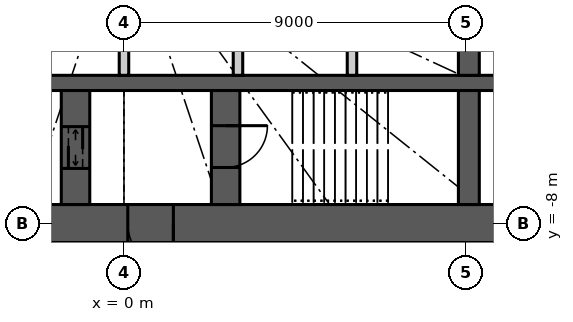
"""IFC4 building model, lengths in metres.
Left out: names, types, materials, properties, quantities, classifications, styles, units other than length and angle.
Written with IfcOpenShell. Run it as: python <this file> out.ifc"""

import sys

from ifc_helpers import new_model, si_unit, direction, frame, frame_2d, origin, place, context, subcontext, project, spatial, rectangle, extrude, element, fill, save


model = new_model("IFC4")
c1 = context("Model", 3, precision=1e-05, world=origin(), true_north=direction((0.0, 1.0)))
c2 = subcontext(c1, "Body", "Model", "MODEL_VIEW")
j1 = project(units=[si_unit("LENGTHUNIT", "METRE"), si_unit("PLANEANGLEUNIT", "RADIAN")], contexts=[c1])
p1 = place(None, origin())
s1 = spatial("IfcSite", under=j1, at=p1, CompositionType="ELEMENT")
p2 = place(p1, origin())
s2 = spatial("IfcBuilding", under=s1, at=p2, CompositionType="ELEMENT")
p3 = place(p2, frame((0.0, 0.0, -6.0)))
s3 = spatial("IfcBuildingStorey", under=s2, at=p3, CompositionType="ELEMENT", Elevation=-6.0)
p4 = place(p3, frame((12.5, -8.0, 0.0), z_axis=(0.0, 0.0, 1.0), x_axis=(-1.0, 0.0, 0.0)))
e1 = element("IfcWall", 1, at=p4, inside=s3, PredefinedType="SHEAR", context=c2, shape_type="SweptSolid", body=[
    extrude(rectangle(XDim=25.0, YDim=1.0, at=frame_2d((12.5, 0.0))), origin(), (0.0, 0.0, 1.0), 6.0),
])
p5 = place(p4, frame((11.2, 0.0, 0.0)))
e2 = element("IfcOpeningElement", 2, at=p5, cuts=e1, PredefinedType="OPENING", context=c2, shape_type="SweptSolid", body=[
    extrude(rectangle(XDim=1.2, YDim=2.2, at=frame_2d((0.6, 1.1))), frame((0.0, 0.51, 0.0), z_axis=(0.0, -1.0, 0.0), x_axis=(1.0, 0.0, 0.0)), (0.0, 0.0, 1.0), 1.02),
])
p6 = place(p4, frame((18.8, 0.0, 0.0)))
e3 = element("IfcOpeningElement", 3, at=p6, cuts=e1, PredefinedType="OPENING", context=c2, shape_type="SweptSolid", body=[
    extrude(rectangle(XDim=0.9, YDim=2.2, at=frame_2d((0.45, 1.1))), frame((0.0, 0.51, 0.0), z_axis=(0.0, -1.0, 0.0), x_axis=(1.0, 0.0, 0.0)), (0.0, 0.0, 1.0), 1.02),
])
p7 = place(p3, frame((-11.5, -4.3, 0.0), z_axis=(0.0, 0.0, 1.0), x_axis=(1.0, 0.0, 0.0)))
e4 = element("IfcWall", 4, at=p7, inside=s3, PredefinedType="SHEAR", context=c2, shape_type="SweptSolid", body=[
    extrude(rectangle(XDim=23.0, YDim=0.4, at=frame_2d((11.5, 0.0))), origin(), (0.0, 0.0, 1.0), 6.0),
])
p8 = place(p3, frame((9.075, -4.1, 0.0), z_axis=(0.0, 0.0, 1.0), x_axis=(0.0, 1.0, 0.0)))
e5 = element("IfcWall", 5, at=p8, inside=s3, PredefinedType="SHEAR", context=c2, shape_type="SweptSolid", body=[
    extrude(rectangle(XDim=2.35, YDim=0.55, at=frame_2d((1.175, 0.0))), origin(), (0.0, 0.0, 1.0), 6.0),
])
p9 = place(p3, frame((9.075, -7.5, 0.0), z_axis=(0.0, 0.0, 1.0), x_axis=(0.0, 1.0, 0.0)))
e6 = element("IfcWall", 6, at=p9, inside=s3, PredefinedType="SHEAR", context=c2, shape_type="SweptSolid", body=[
    extrude(rectangle(XDim=3.0, YDim=0.55, at=frame_2d((1.5, 0.0))), origin(), (0.0, 0.0, 1.0), 6.0),
])
p10 = place(p3, frame((2.675, -7.5, 0.0), z_axis=(0.0, 0.0, 1.0), x_axis=(0.0, 1.0, 0.0)))
e7 = element("IfcWall", 7, at=p10, inside=s3, PredefinedType="SHEAR", context=c2, shape_type="SweptSolid", body=[
    extrude(rectangle(XDim=3.0, YDim=0.75, at=frame_2d((1.5, 0.0))), origin(), (0.0, 0.0, 1.0), 6.0),
])
p11 = place(p10, frame((0.975, 0.0, 0.0)))
e8 = element("IfcOpeningElement", 8, at=p11, cuts=e7, PredefinedType="OPENING", context=c2, shape_type="SweptSolid", body=[
    extrude(rectangle(XDim=1.1, YDim=2.2, at=frame_2d((0.55, 1.1))), frame((0.0, 0.385, 0.0), z_axis=(0.0, -1.0, 0.0), x_axis=(1.0, 0.0, 0.0)), (0.0, 0.0, 1.0), 0.77),
])
p12 = place(p3, frame((-1.275, -7.5, 0.0), z_axis=(0.0, 0.0, 1.0), x_axis=(0.0, 1.0, 0.0)))
e9 = element("IfcWall", 9, at=p12, inside=s3, PredefinedType="SHEAR", context=c2, shape_type="SweptSolid", body=[
    extrude(rectangle(XDim=3.0, YDim=0.75, at=frame_2d((1.5, 0.0))), origin(), (0.0, 0.0, 1.0), 6.0),
])
p13 = place(p12, frame((0.95, 0.0, 0.0)))
e10 = element("IfcOpeningElement", 10, at=p13, cuts=e9, PredefinedType="OPENING", context=c2, shape_type="SweptSolid", body=[
    extrude(rectangle(XDim=1.1, YDim=2.2, at=frame_2d((0.55, 1.1))), frame((0.0, 0.385, 0.0), z_axis=(0.0, -1.0, 0.0), x_axis=(1.0, 0.0, 0.0)), (0.0, 0.0, 1.0), 0.77),
])
for number, where, z_axis, x_axis in (
    (11, (0.0, -4.1, 0.0), (0.0, 0.0, 1.0), (0.0, 1.0, 0.0)),
    (12, (3.0, -4.1, 0.0), (0.0, 0.0, 1.0), (0.0, 1.0, 0.0)),
    (13, (6.0, -4.1, 0.0), (0.0, 0.0, 1.0), (0.0, 1.0, 0.0)),
):
    element("IfcWall", number, at=place(p3, frame(where, z_axis=z_axis, x_axis=x_axis)), inside=s3, PredefinedType="PARTITIONING", context=c2, shape_type="SweptSolid", body=[
        extrude(rectangle(XDim=2.35, YDim=0.25, at=frame_2d((1.175, 0.0))), origin(), (0.0, 0.0, 1.0), 6.0),
    ])
p14 = place(p5, origin())
e14 = element("IfcDoor", 14, at=p14, inside=s3, OperationType="SINGLE_SWING_LEFT", PredefinedType="DOOR", context=c2, shape_type="SweptSolid", body=[
    extrude(rectangle(XDim=1.2, YDim=2.2, at=frame_2d((0.6, 1.1))), frame((0.0, 0.025, 0.0), z_axis=(0.0, -1.0, 0.0), x_axis=(1.0, 0.0, 0.0)), (0.0, 0.0, 1.0), 0.05),
])
fill(e2, e14)
p15 = place(p11, origin())
e15 = element("IfcDoor", 15, at=p15, inside=s3, OperationType="SINGLE_SWING_RIGHT", PredefinedType="DOOR", context=c2, shape_type="SweptSolid", body=[
    extrude(rectangle(XDim=1.1, YDim=2.2, at=frame_2d((0.55, 1.1))), frame((0.0, 0.025, 0.0), z_axis=(0.0, -1.0, 0.0), x_axis=(1.0, 0.0, 0.0)), (0.0, 0.0, 1.0), 0.05),
])
fill(e8, e15)
p16 = place(p13, origin())
e16 = element("IfcDoor", 16, at=p16, inside=s3, OperationType="DOUBLE_DOOR_SLIDING", PredefinedType="DOOR", context=c2, shape_type="SweptSolid", body=[
    extrude(rectangle(XDim=1.1, YDim=2.2, at=frame_2d((0.55, 1.1))), frame((0.0, 0.025, 0.0), z_axis=(0.0, -1.0, 0.0), x_axis=(1.0, 0.0, 0.0)), (0.0, 0.0, 1.0), 0.05),
])
fill(e10, e16)
save(model, sys.argv[1])
